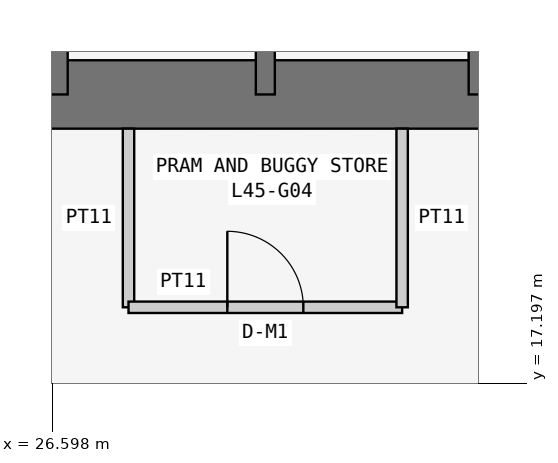
"""IFC4 building model, lengths in metres.
Left out: names, types, materials, properties, quantities, classifications, styles, units other than length and angle.
Written with IfcOpenShell. Run it as: python <this file> out.ifc"""

import sys

from ifc_helpers import new_model, si_unit, direction, frame, frame_2d, origin, place, context, subcontext, project, spatial, rectangle, extrude, element, fill, save


model = new_model("IFC4")
c1 = context("Model", 3, precision=1e-05, world=origin(), true_north=direction((0.0, 1.0)))
c2 = subcontext(c1, "Body", "Model", "MODEL_VIEW")
j1 = project(units=[si_unit("LENGTHUNIT", "METRE"), si_unit("PLANEANGLEUNIT", "RADIAN")], contexts=[c1])
p1 = place(None, origin())
s1 = spatial("IfcSite", under=j1, at=p1, CompositionType="ELEMENT")
p2 = place(p1, origin())
s2 = spatial("IfcBuilding", under=s1, at=p2, CompositionType="ELEMENT")
p3 = place(p2, frame((0.0, 0.0, 173.7)))
s3 = spatial("IfcBuildingStorey", under=s2, at=p3, CompositionType="ELEMENT", Elevation=173.7)
p4 = place(p3, frame((21.0, 21.0, 0.0), z_axis=(0.0, 0.0, 1.0), x_axis=(1.0, 0.0, 0.0)))
e1 = element("IfcWall", 1, at=p4, inside=s3, PredefinedType="SHEAR", context=c2, shape_type="SweptSolid", body=[
    extrude(rectangle(XDim=17.25, YDim=0.9, at=frame_2d((8.625, 0.0))), origin(), (0.0, 0.0, 1.0), 3.6),
])
p5 = place(p3, frame((26.6, 21.0, 0.0), z_axis=(0.0, 0.0, 1.0), x_axis=(0.0, 1.0, 0.0)))
e2 = element("IfcWall", 2, at=p5, inside=s3, PredefinedType="SHEAR", context=c2, shape_type="SweptSolid", body=[
    extrude(rectangle(XDim=16.8, YDim=0.4, at=frame_2d((8.4, 0.0))), origin(), (0.0, 0.0, 1.0), 3.6),
])
p6 = place(p5, frame((10.4, 0.0, 0.0)))
e3 = element("IfcOpeningElement", 3, at=p6, cuts=e2, PredefinedType="OPENING", context=c2, shape_type="SweptSolid", body=[
    extrude(rectangle(XDim=1.2, YDim=2.1, at=frame_2d((0.6, 1.05))), frame((0.0, 0.21, 0.0), z_axis=(0.0, -1.0, 0.0), x_axis=(1.0, 0.0, 0.0)), (0.0, 0.0, 1.0), 0.42),
])
for number, where, z_axis, x_axis in (
    (4, (29.4, 21.0, 0.0), (0.0, 0.0, 1.0), (0.0, 1.0, 0.0)),
    (5, (32.2, 21.0, 0.0), (0.0, 0.0, 1.0), (0.0, 1.0, 0.0)),
):
    element("IfcWall", number, at=place(p3, frame(where, z_axis=z_axis, x_axis=x_axis)), inside=s3, PredefinedType="SHEAR", context=c2, shape_type="SweptSolid", body=[
        extrude(rectangle(XDim=3.2, YDim=0.25, at=frame_2d((1.6, 0.0))), origin(), (0.0, 0.0, 1.0), 3.6),
    ])
p7 = place(p3, frame((27.6, 20.55, 0.0), z_axis=(0.0, 0.0, 1.0), x_axis=(0.0, -1.0, 0.0)))
e6 = element("IfcWall", 6, at=p7, inside=s3, PredefinedType="PARTITIONING", context=c2, shape_type="SweptSolid", body=[
    extrude(rectangle(XDim=2.35, YDim=0.15, at=frame_2d((1.175, 0.0))), origin(), (0.0, 0.0, 1.0), 3.35),
])
p8 = place(p3, frame((27.6, 18.2, 0.0), z_axis=(0.0, 0.0, 1.0), x_axis=(1.0, 0.0, 0.0)))
e7 = element("IfcWall", 7, at=p8, inside=s3, PredefinedType="PARTITIONING", context=c2, shape_type="SweptSolid", body=[
    extrude(rectangle(XDim=3.6, YDim=0.15, at=frame_2d((1.8, 0.0))), origin(), (0.0, 0.0, 1.0), 3.35),
])
p9 = place(p8, frame((1.3, 0.0, 0.0)))
e8 = element("IfcOpeningElement", 8, at=p9, cuts=e7, PredefinedType="OPENING", context=c2, shape_type="SweptSolid", body=[
    extrude(rectangle(XDim=1.0, YDim=2.1, at=frame_2d((0.5, 1.05))), frame((0.0, 0.085, 0.0), z_axis=(0.0, -1.0, 0.0), x_axis=(1.0, 0.0, 0.0)), (0.0, 0.0, 1.0), 0.17),
])
p10 = place(p3, frame((31.2, 18.2, 0.0), z_axis=(0.0, 0.0, 1.0), x_axis=(0.0, 1.0, 0.0)))
e9 = element("IfcWall", 9, at=p10, inside=s3, PredefinedType="PARTITIONING", context=c2, shape_type="SweptSolid", body=[
    extrude(rectangle(XDim=2.35, YDim=0.15, at=frame_2d((1.175, 0.0))), origin(), (0.0, 0.0, 1.0), 3.35),
])
p11 = place(p9, origin())
e10 = element("IfcDoor", 10, at=p11, inside=s3, OperationType="SINGLE_SWING_LEFT", PredefinedType="DOOR", context=c2, shape_type="SweptSolid", body=[
    extrude(rectangle(XDim=1.0, YDim=2.1, at=frame_2d((0.5, 1.05))), frame((0.0, 0.025, 0.0), z_axis=(0.0, -1.0, 0.0), x_axis=(1.0, 0.0, 0.0)), (0.0, 0.0, 1.0), 0.05),
])
fill(e8, e10)
save(model, sys.argv[1])
